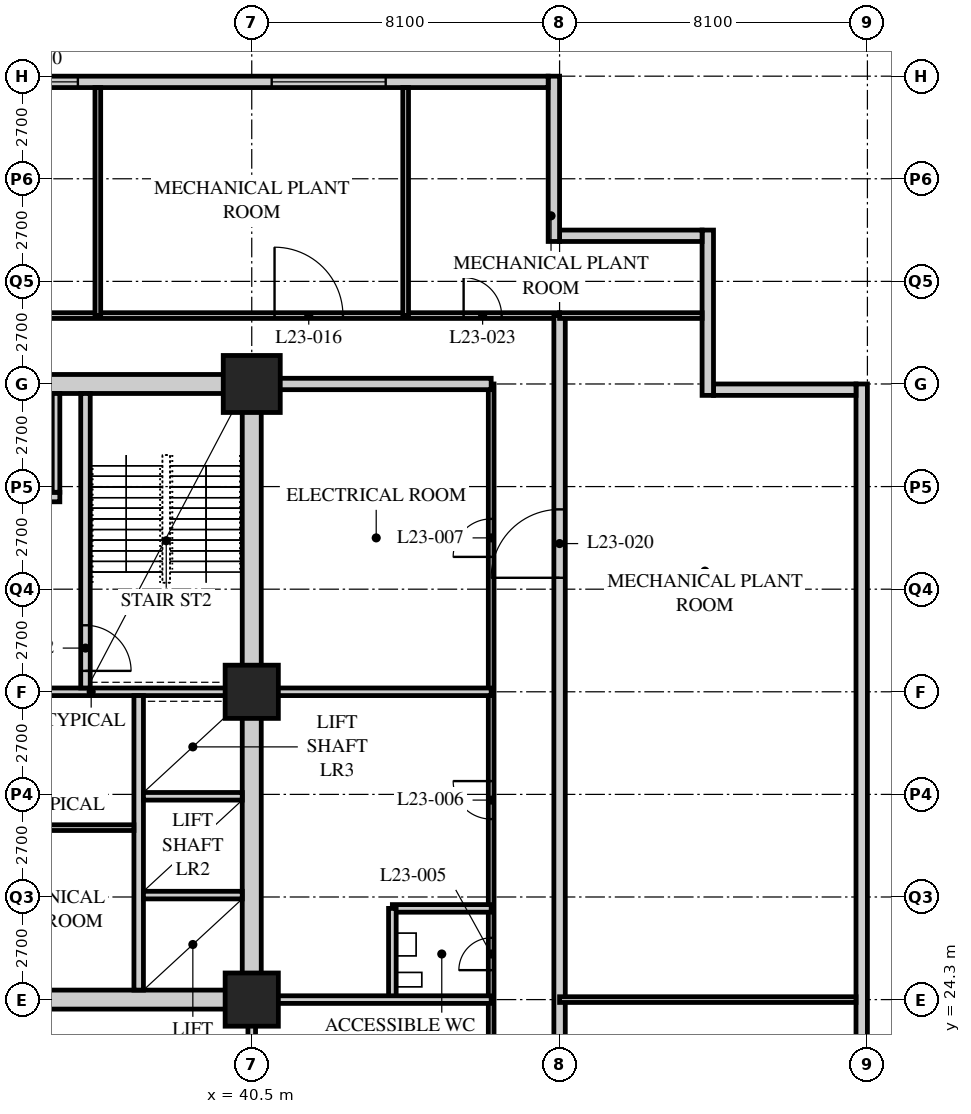
"""IFC4 building model, lengths in metres.
Left out: names, types, materials, properties, quantities, classifications, styles, units other than length and angle.
Written with IfcOpenShell. Run it as: python <this file> out.ifc"""

import sys

from ifc_helpers import new_model, si_unit, direction, frame, frame_2d, origin, origin_2d, place, context, subcontext, project, spatial, rectangle, hollow_rectangle, extrude, element, fill, save


model = new_model("IFC4")
c1 = context("Model", 3, precision=1e-05, world=origin(), true_north=direction((0.0, 1.0)))
c2 = subcontext(c1, "Body", "Model", "MODEL_VIEW")
j1 = project(units=[si_unit("LENGTHUNIT", "METRE"), si_unit("PLANEANGLEUNIT", "RADIAN")], contexts=[c1])
p1 = place(None, origin())
s1 = spatial("IfcSite", under=j1, at=p1, CompositionType="ELEMENT")
p2 = place(p1, origin())
s2 = spatial("IfcBuilding", under=s1, at=p2, CompositionType="ELEMENT")
p3 = place(p2, frame((0.0, 0.0, 90.8)))
s3 = spatial("IfcBuildingStorey", under=s2, at=p3, CompositionType="ELEMENT", Elevation=90.8)
for number, where, z_axis, x_axis in (
    (1, (40.5, 24.3, 0.0), (0.0, 0.0, 1.0), (1.0, 0.0, 0.0)),
    (2, (40.5, 32.4, 0.0), (0.0, 0.0, 1.0), (1.0, 0.0, 0.0)),
):
    element("IfcColumn", number, at=place(p3, frame(where, z_axis=z_axis, x_axis=x_axis)), inside=s3, PredefinedType="COLUMN", context=c2, shape_type="SweptSolid", body=[
        extrude(hollow_rectangle(XDim=1.4, YDim=1.4, WallThickness=0.12, at=origin_2d()), origin(), (0.0, 0.0, 1.0), 7.2),
    ])
p4 = place(p3, frame((40.5, 40.5, 0.0), z_axis=(0.0, 0.0, 1.0), x_axis=(1.0, 0.0, 0.0)))
e3 = element("IfcColumn", 3, at=p4, inside=s3, PredefinedType="COLUMN", context=c2, shape_type="SweptSolid", body=[
    extrude(hollow_rectangle(XDim=1.5, YDim=1.5, WallThickness=0.13, at=origin_2d()), origin(), (0.0, 0.0, 1.0), 7.2),
])
p5 = place(p3, frame((56.55, 8.4, 0.0), z_axis=(0.0, 0.0, 1.0), x_axis=(0.0, 1.0, 0.0)))
e4 = element("IfcWall", 4, at=p5, inside=s3, PredefinedType="SOLIDWALL", context=c2, shape_type="SweptSolid", body=[
    extrude(rectangle(XDim=32.1, YDim=0.3, at=frame_2d((16.05, 0.0))), origin(), (0.0, 0.0, 1.0), 5.85),
])
p6 = place(p3, frame((56.4, 40.35, 0.0), z_axis=(0.0, 0.0, 1.0), x_axis=(-1.0, 0.0, 0.0)))
e5 = element("IfcWall", 5, at=p6, inside=s3, PredefinedType="SOLIDWALL", context=c2, shape_type="SweptSolid", body=[
    extrude(rectangle(XDim=3.75, YDim=0.3, at=frame_2d((1.875, 0.0))), origin(), (0.0, 0.0, 1.0), 5.85),
])
p7 = place(p3, frame((52.5, 40.2, 0.0), z_axis=(0.0, 0.0, 1.0), x_axis=(0.0, 1.0, 0.0)))
e6 = element("IfcWall", 6, at=p7, inside=s3, PredefinedType="SOLIDWALL", context=c2, shape_type="SweptSolid", body=[
    extrude(rectangle(XDim=4.35, YDim=0.3, at=frame_2d((2.175, 0.0))), origin(), (0.0, 0.0, 1.0), 6.95),
])
p8 = place(p3, frame((52.35, 44.4, 0.0), z_axis=(0.0, 0.0, 1.0), x_axis=(-1.0, 0.0, 0.0)))
e7 = element("IfcWall", 7, at=p8, inside=s3, PredefinedType="SOLIDWALL", context=c2, shape_type="SweptSolid", body=[
    extrude(rectangle(XDim=3.75, YDim=0.3, at=frame_2d((1.875, 0.0))), origin(), (0.0, 0.0, 1.0), 6.95),
])
p9 = place(p3, frame((48.45, 44.25, 0.0), z_axis=(0.0, 0.0, 1.0), x_axis=(0.0, 1.0, 0.0)))
e8 = element("IfcWall", 8, at=p9, inside=s3, PredefinedType="SOLIDWALL", context=c2, shape_type="SweptSolid", body=[
    extrude(rectangle(XDim=4.35, YDim=0.3, at=frame_2d((2.175, 0.0))), origin(), (0.0, 0.0, 1.0), 5.85),
])
p10 = place(p3, frame((48.3, 48.45, 0.0), z_axis=(0.0, 0.0, 1.0), x_axis=(-1.0, 0.0, 0.0)))
e9 = element("IfcWall", 9, at=p10, inside=s3, PredefinedType="SOLIDWALL", context=c2, shape_type="SweptSolid", body=[
    extrude(rectangle(XDim=40.2, YDim=0.3, at=frame_2d((20.1, 0.0))), origin(), (0.0, 0.0, 1.0), 5.85),
])
p11 = place(p10, frame((4.275, 0.0, 1.0)))
e10 = element("IfcOpeningElement", 10, at=p11, cuts=e9, PredefinedType="OPENING", context=c2, shape_type="SweptSolid", body=[
    extrude(rectangle(XDim=3.0, YDim=1.7, at=frame_2d((1.5, 0.85))), frame((0.0, 0.16, 0.0), z_axis=(0.0, -1.0, 0.0), x_axis=(1.0, 0.0, 0.0)), (0.0, 0.0, 1.0), 0.32),
])
p12 = place(p10, frame((12.375, 0.0, 1.0)))
e11 = element("IfcOpeningElement", 11, at=p12, cuts=e9, PredefinedType="OPENING", context=c2, shape_type="SweptSolid", body=[
    extrude(rectangle(XDim=3.0, YDim=1.7, at=frame_2d((1.5, 0.85))), frame((0.0, 0.16, 0.0), z_axis=(0.0, -1.0, 0.0), x_axis=(1.0, 0.0, 0.0)), (0.0, 0.0, 1.0), 0.32),
])
p13 = place(p10, frame((24.525, 0.0, 1.0)))
e12 = element("IfcOpeningElement", 12, at=p13, cuts=e9, PredefinedType="OPENING", context=c2, shape_type="SweptSolid", body=[
    extrude(rectangle(XDim=3.0, YDim=1.7, at=frame_2d((1.5, 0.85))), frame((0.0, 0.16, 0.0), z_axis=(0.0, -1.0, 0.0), x_axis=(1.0, 0.0, 0.0)), (0.0, 0.0, 1.0), 0.32),
])
p14 = place(p10, frame((32.625, 0.0, 1.0)))
e13 = element("IfcOpeningElement", 13, at=p14, cuts=e9, PredefinedType="OPENING", context=c2, shape_type="SweptSolid", body=[
    extrude(rectangle(XDim=3.0, YDim=1.7, at=frame_2d((1.5, 0.85))), frame((0.0, 0.16, 0.0), z_axis=(0.0, -1.0, 0.0), x_axis=(1.0, 0.0, 0.0)), (0.0, 0.0, 1.0), 0.32),
])
p15 = place(p3, frame((8.1, 42.3, 0.0), z_axis=(0.0, 0.0, 1.0), x_axis=(1.0, 0.0, 0.0)))
e14 = element("IfcWall", 14, at=p15, inside=s3, PredefinedType="PARTITIONING", context=c2, shape_type="SweptSolid", body=[
    extrude(rectangle(XDim=40.5, YDim=0.15, at=frame_2d((20.25, 0.0))), origin(), (0.0, 0.0, 1.0), 6.95),
])
p16 = place(p15, frame((8.7, 0.0, 0.0)))
e15 = element("IfcOpeningElement", 15, at=p16, cuts=e14, PredefinedType="OPENING", context=c2, shape_type="SweptSolid", body=[
    extrude(rectangle(XDim=1.8, YDim=2.4, at=frame_2d((0.9, 1.2))), frame((0.0, 0.085, 0.0), z_axis=(0.0, -1.0, 0.0), x_axis=(1.0, 0.0, 0.0)), (0.0, 0.0, 1.0), 0.17),
])
p17 = place(p15, frame((19.35, 0.0, 0.0)))
e16 = element("IfcOpeningElement", 16, at=p17, cuts=e14, PredefinedType="OPENING", context=c2, shape_type="SweptSolid", body=[
    extrude(rectangle(XDim=1.8, YDim=2.4, at=frame_2d((0.9, 1.2))), frame((0.0, 0.085, 0.0), z_axis=(0.0, -1.0, 0.0), x_axis=(1.0, 0.0, 0.0)), (0.0, 0.0, 1.0), 0.17),
])
p18 = place(p15, frame((33.0, 0.0, 0.0)))
e17 = element("IfcOpeningElement", 17, at=p18, cuts=e14, PredefinedType="OPENING", context=c2, shape_type="SweptSolid", body=[
    extrude(rectangle(XDim=1.8, YDim=2.4, at=frame_2d((0.9, 1.2))), frame((0.0, 0.085, 0.0), z_axis=(0.0, -1.0, 0.0), x_axis=(1.0, 0.0, 0.0)), (0.0, 0.0, 1.0), 0.17),
])
p19 = place(p15, frame((37.975, 0.0, 0.0)))
e18 = element("IfcOpeningElement", 18, at=p19, cuts=e14, PredefinedType="OPENING", context=c2, shape_type="SweptSolid", body=[
    extrude(rectangle(XDim=1.0, YDim=2.1, at=frame_2d((0.5, 1.05))), frame((0.0, 0.085, 0.0), z_axis=(0.0, -1.0, 0.0), x_axis=(1.0, 0.0, 0.0)), (0.0, 0.0, 1.0), 0.17),
])
p20 = place(p15, frame((1.525, 0.0, 0.0)))
e19 = element("IfcOpeningElement", 19, at=p20, cuts=e14, PredefinedType="OPENING", context=c2, shape_type="SweptSolid", body=[
    extrude(rectangle(XDim=1.0, YDim=2.1, at=frame_2d((0.5, 1.05))), frame((0.0, 0.085, 0.0), z_axis=(0.0, -1.0, 0.0), x_axis=(1.0, 0.0, 0.0)), (0.0, 0.0, 1.0), 0.17),
])
p21 = place(p3, frame((48.6, 8.1, 0.0), z_axis=(0.0, 0.0, 1.0), x_axis=(0.0, 1.0, 0.0)))
e20 = element("IfcWall", 20, at=p21, inside=s3, PredefinedType="PARTITIONING", context=c2, shape_type="SweptSolid", body=[
    extrude(rectangle(XDim=34.2, YDim=0.3, at=frame_2d((17.1, 0.0))), origin(), (0.0, 0.0, 1.0), 5.85),
])
p22 = place(p21, frame((2.95, 0.0, 0.0)))
e21 = element("IfcOpeningElement", 21, at=p22, cuts=e20, PredefinedType="OPENING", context=c2, shape_type="SweptSolid", body=[
    extrude(rectangle(XDim=1.8, YDim=2.4, at=frame_2d((0.9, 1.2))), frame((0.0, 0.16, 0.0), z_axis=(0.0, -1.0, 0.0), x_axis=(1.0, 0.0, 0.0)), (0.0, 0.0, 1.0), 0.32),
])
p23 = place(p21, frame((27.3, 0.0, 0.0)))
e22 = element("IfcOpeningElement", 22, at=p23, cuts=e20, PredefinedType="OPENING", context=c2, shape_type="SweptSolid", body=[
    extrude(rectangle(XDim=1.8, YDim=2.4, at=frame_2d((0.9, 1.2))), frame((0.0, 0.16, 0.0), z_axis=(0.0, -1.0, 0.0), x_axis=(1.0, 0.0, 0.0)), (0.0, 0.0, 1.0), 0.32),
])
p24 = place(p3, frame((46.8, 9.9, 0.0), z_axis=(0.0, 0.0, 1.0), x_axis=(0.0, 1.0, 0.0)))
e23 = element("IfcWall", 23, at=p24, inside=s3, PredefinedType="PARTITIONING", context=c2, shape_type="SweptSolid", body=[
    extrude(rectangle(XDim=30.6, YDim=0.15, at=frame_2d((15.3, 0.0))), origin(), (0.0, 0.0, 1.0), 6.95),
])
p25 = place(p24, frame((15.175, 0.0, 0.0)))
e24 = element("IfcOpeningElement", 24, at=p25, cuts=e23, PredefinedType="OPENING", context=c2, shape_type="SweptSolid", body=[
    extrude(rectangle(XDim=0.85, YDim=2.1, at=frame_2d((0.425, 1.05))), frame((0.0, 0.085, 0.0), z_axis=(0.0, -1.0, 0.0), x_axis=(1.0, 0.0, 0.0)), (0.0, 0.0, 1.0), 0.17),
])
p26 = place(p24, frame((19.15, 0.0, 0.0)))
e25 = element("IfcOpeningElement", 25, at=p26, cuts=e23, PredefinedType="OPENING", context=c2, shape_type="SweptSolid", body=[
    extrude(rectangle(XDim=1.0, YDim=2.1, at=frame_2d((0.5, 1.05))), frame((0.0, 0.085, 0.0), z_axis=(0.0, -1.0, 0.0), x_axis=(1.0, 0.0, 0.0)), (0.0, 0.0, 1.0), 0.17),
])
p27 = place(p24, frame((26.05, 0.0, 0.0)))
e26 = element("IfcOpeningElement", 26, at=p27, cuts=e23, PredefinedType="OPENING", context=c2, shape_type="SweptSolid", body=[
    extrude(rectangle(XDim=1.0, YDim=2.1, at=frame_2d((0.5, 1.05))), frame((0.0, 0.085, 0.0), z_axis=(0.0, -1.0, 0.0), x_axis=(1.0, 0.0, 0.0)), (0.0, 0.0, 1.0), 0.17),
])
p28 = place(p3, frame((46.8, 40.5, 0.0), z_axis=(0.0, 0.0, 1.0), x_axis=(-1.0, 0.0, 0.0)))
e27 = element("IfcWall", 27, at=p28, inside=s3, PredefinedType="PARTITIONING", context=c2, shape_type="SweptSolid", body=[
    extrude(rectangle(XDim=6.1, YDim=0.3, at=frame_2d((3.05, 0.0))), origin(), (0.0, 0.0, 1.0), 5.85),
])
p29 = place(p3, frame((40.5, 32.4, 0.0), z_axis=(0.0, 0.0, 1.0), x_axis=(1.0, 0.0, 0.0)))
e28 = element("IfcWall", 28, at=p29, inside=s3, PredefinedType="SOLIDWALL", context=c2, shape_type="SweptSolid", body=[
    extrude(rectangle(XDim=6.3, YDim=0.2, at=frame_2d((3.15, 0.0))), origin(), (0.0, 0.0, 1.0), 6.95),
])
p30 = place(p3, frame((46.8, 26.7, 0.0), z_axis=(0.0, 0.0, 1.0), x_axis=(-1.0, 0.0, 0.0)))
e29 = element("IfcWall", 29, at=p30, inside=s3, PredefinedType="SOLIDWALL", context=c2, shape_type="SweptSolid", body=[
    extrude(rectangle(XDim=2.6, YDim=0.2, at=frame_2d((1.3, 0.0))), origin(), (0.0, 0.0, 1.0), 6.95),
])
p31 = place(p3, frame((44.2, 24.3, 0.0), z_axis=(0.0, 0.0, 1.0), x_axis=(0.0, 1.0, 0.0)))
e30 = element("IfcWall", 30, at=p31, inside=s3, PredefinedType="SOLIDWALL", context=c2, shape_type="SweptSolid", body=[
    extrude(rectangle(XDim=2.4, YDim=0.2, at=frame_2d((1.2, 0.0))), origin(), (0.0, 0.0, 1.0), 6.95),
])
p32 = place(p3, frame((40.5, 9.9, 0.0), z_axis=(0.0, 0.0, 1.0), x_axis=(0.0, 1.0, 0.0)))
e31 = element("IfcWall", 31, at=p32, inside=s3, PredefinedType="SOLIDWALL", context=c2, shape_type="SweptSolid", body=[
    extrude(rectangle(XDim=14.4, YDim=0.2, at=frame_2d((7.2, 0.0))), origin(), (0.0, 0.0, 1.0), 5.85),
])
p33 = place(p3, frame((40.5, 24.3, 0.0), z_axis=(0.0, 0.0, 1.0), x_axis=(1.0, 0.0, 0.0)))
e32 = element("IfcWall", 32, at=p33, inside=s3, PredefinedType="SOLIDWALL", context=c2, shape_type="SweptSolid", body=[
    extrude(rectangle(XDim=6.3, YDim=0.2, at=frame_2d((3.15, 0.0))), origin(), (0.0, 0.0, 1.0), 5.85),
])
p34 = place(p3, frame((36.45, 42.3, 0.0), z_axis=(0.0, 0.0, 1.0), x_axis=(0.0, 1.0, 0.0)))
e33 = element("IfcWall", 33, at=p34, inside=s3, PredefinedType="PARTITIONING", context=c2, shape_type="SweptSolid", body=[
    extrude(rectangle(XDim=6.0, YDim=0.15, at=frame_2d((3.0, 0.0))), origin(), (0.0, 0.0, 1.0), 6.95),
])
p35 = place(p3, frame((48.6, 24.3, 0.0), z_axis=(0.0, 0.0, 1.0), x_axis=(1.0, 0.0, 0.0)))
e34 = element("IfcWall", 34, at=p35, inside=s3, PredefinedType="PARTITIONING", context=c2, shape_type="SweptSolid", body=[
    extrude(rectangle(XDim=7.8, YDim=0.15, at=frame_2d((3.9, 0.0))), origin(), (0.0, 0.0, 1.0), 5.85),
])
p36 = place(p3, frame((48.6, 42.3, 0.0), z_axis=(0.0, 0.0, 1.0), x_axis=(1.0, 0.0, 0.0)))
e35 = element("IfcWall", 35, at=p36, inside=s3, PredefinedType="PARTITIONING", context=c2, shape_type="SweptSolid", body=[
    extrude(rectangle(XDim=3.75, YDim=0.15, at=frame_2d((1.875, 0.0))), origin(), (0.0, 0.0, 1.0), 6.95),
])
p37 = place(p3, frame((44.55, 42.3, 0.0), z_axis=(0.0, 0.0, 1.0), x_axis=(0.0, 1.0, 0.0)))
e36 = element("IfcWall", 36, at=p37, inside=s3, PredefinedType="PARTITIONING", context=c2, shape_type="SweptSolid", body=[
    extrude(rectangle(XDim=6.0, YDim=0.15, at=frame_2d((3.0, 0.0))), origin(), (0.0, 0.0, 1.0), 6.95),
])
p38 = place(p3, frame((15.95, 24.3, 0.0), z_axis=(0.0, 0.0, 1.0), x_axis=(1.0, 0.0, 0.0)))
e37 = element("IfcWall", 37, at=p38, inside=s3, PredefinedType="SOLIDWALL", context=c2, shape_type="SweptSolid", body=[
    extrude(rectangle(XDim=24.8, YDim=0.5, at=frame_2d((12.4, 0.0))), origin(), (0.0, 0.0, 1.0), 6.188),
])
p39 = place(p38, frame((11.5, 0.0, 0.0)))
e38 = element("IfcOpeningElement", 38, at=p39, cuts=e37, PredefinedType="OPENING", context=c2, shape_type="SweptSolid", body=[
    extrude(rectangle(XDim=1.8, YDim=2.4, at=frame_2d((0.9, 1.2))), frame((0.0, 0.26, 0.0), z_axis=(0.0, -1.0, 0.0), x_axis=(1.0, 0.0, 0.0)), (0.0, 0.0, 1.0), 0.52),
])
p40 = place(p3, frame((15.95, 40.5, 0.0), z_axis=(0.0, 0.0, 1.0), x_axis=(1.0, 0.0, 0.0)))
e39 = element("IfcWall", 39, at=p40, inside=s3, PredefinedType="SOLIDWALL", context=c2, shape_type="SweptSolid", body=[
    extrude(rectangle(XDim=24.8, YDim=0.5, at=frame_2d((12.4, 0.0))), origin(), (0.0, 0.0, 1.0), 6.188),
])
p41 = place(p40, frame((11.5, 0.0, 0.0)))
e40 = element("IfcOpeningElement", 40, at=p41, cuts=e39, PredefinedType="OPENING", context=c2, shape_type="SweptSolid", body=[
    extrude(rectangle(XDim=1.8, YDim=2.4, at=frame_2d((0.9, 1.2))), frame((0.0, 0.26, 0.0), z_axis=(0.0, -1.0, 0.0), x_axis=(1.0, 0.0, 0.0)), (0.0, 0.0, 1.0), 0.52),
])
p42 = place(p3, frame((40.5, 24.55, 0.0), z_axis=(0.0, 0.0, 1.0), x_axis=(0.0, 1.0, 0.0)))
e41 = element("IfcWall", 41, at=p42, inside=s3, PredefinedType="SOLIDWALL", context=c2, shape_type="SweptSolid", body=[
    extrude(rectangle(XDim=15.7, YDim=0.5, at=frame_2d((7.85, 0.0))), origin(), (0.0, 0.0, 1.0), 5.85),
])
p43 = place(p3, frame((32.3, 32.4, 0.0), z_axis=(0.0, 0.0, 1.0), x_axis=(1.0, 0.0, 0.0)))
e42 = element("IfcWall", 42, at=p43, inside=s3, PredefinedType="SOLIDWALL", context=c2, shape_type="SweptSolid", body=[
    extrude(rectangle(XDim=7.95, YDim=0.2, at=frame_2d((3.975, 0.0))), origin(), (0.0, 0.0, 1.0), 6.25),
])
p44 = place(p3, frame((37.525, 24.55, 0.0), z_axis=(0.0, 0.0, 1.0), x_axis=(0.0, 1.0, 0.0)))
e43 = element("IfcWall", 43, at=p44, inside=s3, PredefinedType="SOLIDWALL", context=c2, shape_type="SweptSolid", body=[
    extrude(rectangle(XDim=7.75, YDim=0.25, at=frame_2d((3.875, 0.0))), origin(), (0.0, 0.0, 1.0), 6.95),
])
for number, where, z_axis, x_axis in (
    (44, (37.65, 27.05, 0.0), (0.0, 0.0, 1.0), (1.0, 0.0, 0.0)),
    (45, (37.65, 29.65, 0.0), (0.0, 0.0, 1.0), (1.0, 0.0, 0.0)),
):
    element("IfcWall", number, at=place(p3, frame(where, z_axis=z_axis, x_axis=x_axis)), inside=s3, PredefinedType="SOLIDWALL", context=c2, shape_type="SweptSolid", body=[
        extrude(rectangle(XDim=2.6, YDim=0.2, at=frame_2d((1.3, 0.0))), origin(), (0.0, 0.0, 1.0), 6.95),
    ])
p45 = place(p3, frame((36.125, 32.5, 0.0), z_axis=(0.0, 0.0, 1.0), x_axis=(0.0, 1.0, 0.0)))
e46 = element("IfcWall", 46, at=p45, inside=s3, PredefinedType="SOLIDWALL", context=c2, shape_type="SweptSolid", body=[
    extrude(rectangle(XDim=7.75, YDim=0.25, at=frame_2d((3.875, 0.0))), origin(), (0.0, 0.0, 1.0), 6.95),
])
p46 = place(p45, frame((0.45, 0.0, 0.0)))
e47 = element("IfcOpeningElement", 47, at=p46, cuts=e46, PredefinedType="OPENING", context=c2, shape_type="SweptSolid", body=[
    extrude(rectangle(XDim=1.2, YDim=2.1, at=frame_2d((0.6, 1.05))), frame((0.0, 0.135, 0.0), z_axis=(0.0, -1.0, 0.0), x_axis=(1.0, 0.0, 0.0)), (0.0, 0.0, 1.0), 0.27),
])
p47 = place(p3, frame((32.5, 37.525, 0.0), z_axis=(0.0, 0.0, 1.0), x_axis=(1.0, 0.0, 0.0)))
e48 = element("IfcWall", 48, at=p47, inside=s3, PredefinedType="SOLIDWALL", context=c2, shape_type="SweptSolid", body=[
    extrude(rectangle(XDim=2.95, YDim=0.25, at=frame_2d((1.475, 0.0))), origin(), (0.0, 0.0, 1.0), 6.95),
])
p48 = place(p47, frame((0.9, 0.0, 0.0)))
e49 = element("IfcOpeningElement", 49, at=p48, cuts=e48, PredefinedType="OPENING", context=c2, shape_type="SweptSolid", body=[
    extrude(rectangle(XDim=1.1, YDim=2.4, at=frame_2d((0.55, 1.2))), frame((0.0, 0.135, 0.0), z_axis=(0.0, -1.0, 0.0), x_axis=(1.0, 0.0, 0.0)), (0.0, 0.0, 1.0), 0.27),
])
p49 = place(p3, frame((35.35, 37.65, 0.0), z_axis=(0.0, 0.0, 1.0), x_axis=(0.0, 1.0, 0.0)))
e50 = element("IfcWall", 50, at=p49, inside=s3, PredefinedType="SOLIDWALL", context=c2, shape_type="SweptSolid", body=[
    extrude(rectangle(XDim=2.6, YDim=0.2, at=frame_2d((1.3, 0.0))), origin(), (0.0, 0.0, 1.0), 6.95),
])
p50 = place(p3, frame((32.5, 28.825, 0.0), z_axis=(0.0, 0.0, 1.0), x_axis=(1.0, 0.0, 0.0)))
e51 = element("IfcWall", 51, at=p50, inside=s3, PredefinedType="PARTITIONING", context=c2, shape_type="SweptSolid", body=[
    extrude(rectangle(XDim=4.9, YDim=0.15, at=frame_2d((2.45, 0.0))), origin(), (0.0, 0.0, 1.0), 6.95),
])
p51 = place(p11, origin())
e52 = element("IfcWindow", 52, at=p51, inside=s3, PartitioningType="SINGLE_PANEL", PredefinedType="USERDEFINED", context=c2, shape_type="SweptSolid", body=[
    extrude(rectangle(XDim=3.0, YDim=1.7, at=frame_2d((1.5, 0.85))), frame((0.0, 0.075, 0.0), z_axis=(0.0, -1.0, 0.0), x_axis=(1.0, 0.0, 0.0)), (0.0, 0.0, 1.0), 0.15),
])
fill(e10, e52)
p52 = place(p12, origin())
e53 = element("IfcWindow", 53, at=p52, inside=s3, PartitioningType="SINGLE_PANEL", PredefinedType="USERDEFINED", context=c2, shape_type="SweptSolid", body=[
    extrude(rectangle(XDim=3.0, YDim=1.7, at=frame_2d((1.5, 0.85))), frame((0.0, 0.075, 0.0), z_axis=(0.0, -1.0, 0.0), x_axis=(1.0, 0.0, 0.0)), (0.0, 0.0, 1.0), 0.15),
])
fill(e11, e53)
p53 = place(p25, origin())
e54 = element("IfcDoor", 54, at=p53, inside=s3, OperationType="SINGLE_SWING_LEFT", PredefinedType="DOOR", context=c2, shape_type="SweptSolid", body=[
    extrude(rectangle(XDim=0.85, YDim=2.1, at=frame_2d((0.425, 1.05))), frame((0.0, 0.025, 0.0), z_axis=(0.0, -1.0, 0.0), x_axis=(1.0, 0.0, 0.0)), (0.0, 0.0, 1.0), 0.05),
])
fill(e24, e54)
p54 = place(p26, origin())
e55 = element("IfcDoor", 55, at=p54, inside=s3, OperationType="SINGLE_SWING_RIGHT", PredefinedType="DOOR", context=c2, shape_type="SweptSolid", body=[
    extrude(rectangle(XDim=1.0, YDim=2.1, at=frame_2d((0.5, 1.05))), frame((0.0, 0.025, 0.0), z_axis=(0.0, -1.0, 0.0), x_axis=(1.0, 0.0, 0.0)), (0.0, 0.0, 1.0), 0.05),
])
fill(e25, e55)
p55 = place(p27, origin())
e56 = element("IfcDoor", 56, at=p55, inside=s3, OperationType="SINGLE_SWING_LEFT", PredefinedType="DOOR", context=c2, shape_type="SweptSolid", body=[
    extrude(rectangle(XDim=1.0, YDim=2.1, at=frame_2d((0.5, 1.05))), frame((0.0, 0.025, 0.0), z_axis=(0.0, -1.0, 0.0), x_axis=(1.0, 0.0, 0.0)), (0.0, 0.0, 1.0), 0.05),
])
fill(e26, e56)
p56 = place(p18, origin())
e57 = element("IfcDoor", 57, at=p56, inside=s3, OperationType="DOUBLE_DOOR_SINGLE_SWING", PredefinedType="DOOR", context=c2, shape_type="SweptSolid", body=[
    extrude(rectangle(XDim=1.8, YDim=2.4, at=frame_2d((0.9, 1.2))), frame((0.0, 0.025, 0.0), z_axis=(0.0, -1.0, 0.0), x_axis=(1.0, 0.0, 0.0)), (0.0, 0.0, 1.0), 0.05),
])
fill(e17, e57)
p57 = place(p23, origin())
e58 = element("IfcDoor", 58, at=p57, inside=s3, OperationType="DOUBLE_DOOR_SINGLE_SWING", PredefinedType="DOOR", context=c2, shape_type="SweptSolid", body=[
    extrude(rectangle(XDim=1.8, YDim=2.4, at=frame_2d((0.9, 1.2))), frame((0.0, 0.025, 0.0), z_axis=(0.0, -1.0, 0.0), x_axis=(1.0, 0.0, 0.0)), (0.0, 0.0, 1.0), 0.05),
])
fill(e22, e58)
p58 = place(p19, origin())
e59 = element("IfcDoor", 59, at=p58, inside=s3, OperationType="SINGLE_SWING_LEFT", PredefinedType="DOOR", context=c2, shape_type="SweptSolid", body=[
    extrude(rectangle(XDim=1.0, YDim=2.1, at=frame_2d((0.5, 1.05))), frame((0.0, 0.025, 0.0), z_axis=(0.0, -1.0, 0.0), x_axis=(1.0, 0.0, 0.0)), (0.0, 0.0, 1.0), 0.05),
])
fill(e18, e59)
p59 = place(p46, origin())
e60 = element("IfcDoor", 60, at=p59, inside=s3, OperationType="SINGLE_SWING_RIGHT", PredefinedType="DOOR", context=c2, shape_type="SweptSolid", body=[
    extrude(rectangle(XDim=1.2, YDim=2.1, at=frame_2d((0.6, 1.05))), frame((0.0, 0.025, 0.0), z_axis=(0.0, -1.0, 0.0), x_axis=(1.0, 0.0, 0.0)), (0.0, 0.0, 1.0), 0.05),
])
fill(e47, e60)
save(model, sys.argv[1])
